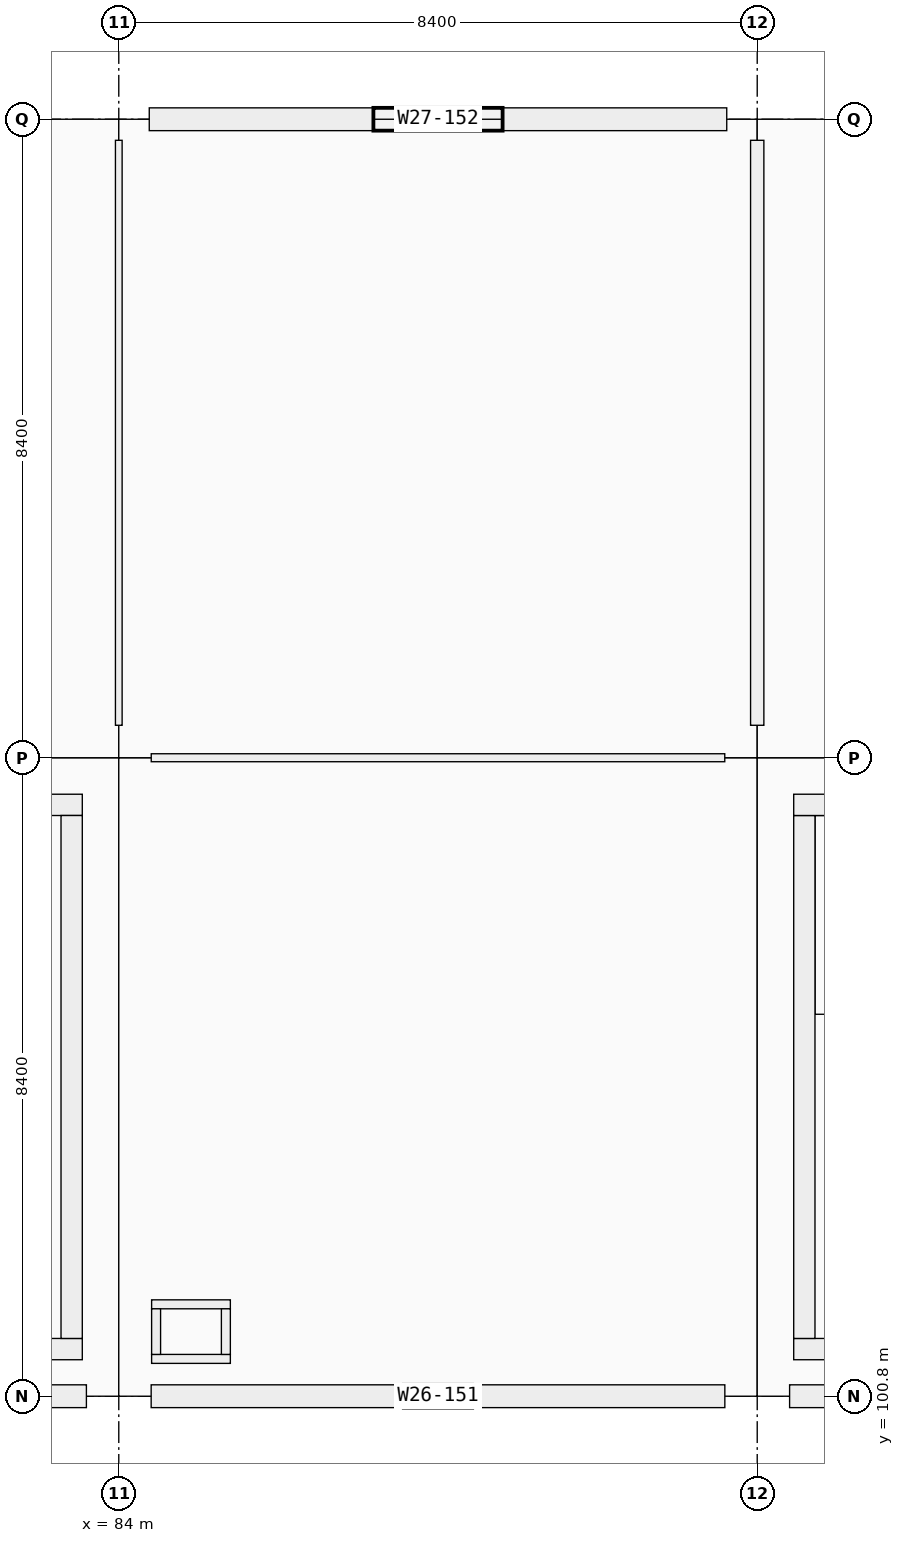
"""IFC4 building model, lengths in metres.
Left out: names, types, materials, properties, quantities, classifications, styles, units other than length and angle.
Written with IfcOpenShell. Run it as: python <this file> out.ifc"""

import sys

from ifc_helpers import new_model, si_unit, direction, frame, frame_2d, origin, origin_2d, place, context, subcontext, project, spatial, rectangle, extrude, element, fill, save


model = new_model("IFC4")
c1 = context("Model", 3, precision=1e-05, world=origin(), true_north=direction((0.0, 1.0)))
c2 = subcontext(c1, "Body", "Model", "MODEL_VIEW")
j1 = project(units=[si_unit("LENGTHUNIT", "METRE"), si_unit("PLANEANGLEUNIT", "RADIAN")], contexts=[c1])
p1 = place(None, origin())
s1 = spatial("IfcSite", under=j1, at=p1, CompositionType="ELEMENT")
p2 = place(p1, origin())
s2 = spatial("IfcBuilding", under=s1, at=p2, CompositionType="ELEMENT")
p3 = place(p2, frame((0.0, 0.0, 10.26)))
s3 = spatial("IfcBuildingStorey", under=s2, at=p3, CompositionType="ELEMENT", Elevation=10.26)
for number, where, z_axis, x_axis in (
    (1, (84.0, 100.8, 0.0), (0.0, 0.0, 1.0), (1.0, 0.0, 0.0)),
    (2, (84.0, 109.2, 0.0), (0.0, 0.0, 1.0), (1.0, 0.0, 0.0)),
):
    element("IfcColumn", number, at=place(p3, frame(where, z_axis=z_axis, x_axis=x_axis)), inside=s3, PredefinedType="COLUMN", context=c2, shape_type="SweptSolid", body=[
        extrude(rectangle(XDim=0.85, YDim=0.85, at=origin_2d()), origin(), (0.0, 0.0, 1.0), 4.5),
    ])
p4 = place(p3, frame((84.0, 117.6, 0.0), z_axis=(0.0, 0.0, 1.0), x_axis=(1.0, 0.0, 0.0)))
e3 = element("IfcColumn", 3, at=p4, inside=s3, PredefinedType="COLUMN", context=c2, shape_type="SweptSolid", body=[
    extrude(rectangle(XDim=0.8, YDim=0.55, at=origin_2d()), origin(), (0.0, 0.0, 1.0), 4.5),
])
for number, where, z_axis, x_axis in (
    (4, (92.4, 100.8, 0.0), (0.0, 0.0, 1.0), (1.0, 0.0, 0.0)),
    (5, (92.4, 109.2, 0.0), (0.0, 0.0, 1.0), (1.0, 0.0, 0.0)),
):
    element("IfcColumn", number, at=place(p3, frame(where, z_axis=z_axis, x_axis=x_axis)), inside=s3, PredefinedType="COLUMN", context=c2, shape_type="SweptSolid", body=[
        extrude(rectangle(XDim=0.85, YDim=0.85, at=origin_2d()), origin(), (0.0, 0.0, 1.0), 4.5),
    ])
p5 = place(p3, frame((92.4, 117.6, 0.0), z_axis=(0.0, 0.0, 1.0), x_axis=(1.0, 0.0, 0.0)))
e6 = element("IfcColumn", 6, at=p5, inside=s3, PredefinedType="COLUMN", context=c2, shape_type="SweptSolid", body=[
    extrude(rectangle(XDim=0.8, YDim=0.55, at=origin_2d()), origin(), (0.0, 0.0, 1.0), 4.5),
])
p6 = place(p3, frame((83.574, 100.8, 0.0), z_axis=(0.0, 0.0, 1.0), x_axis=(-1.0, 0.0, 0.0)))
e7 = element("IfcWall", 7, at=p6, inside=s3, PredefinedType="SOLIDWALL", context=c2, shape_type="SweptSolid", body=[
    extrude(rectangle(XDim=7.548, YDim=0.3, at=frame_2d((3.774, 0.0))), origin(), (0.0, 0.0, 1.0), 3.54),
])
p7 = place(p3, frame((91.974, 100.8, 0.0), z_axis=(0.0, 0.0, 1.0), x_axis=(-1.0, 0.0, 0.0)))
e8 = element("IfcWall", 8, at=p7, inside=s3, PredefinedType="SOLIDWALL", context=c2, shape_type="SweptSolid", body=[
    extrude(rectangle(XDim=7.548, YDim=0.3, at=frame_2d((3.774, 0.0))), origin(), (0.0, 0.0, 1.0), 3.54),
])
p8 = place(p7, frame((3.324, 0.0, 0.9)))
e9 = element("IfcOpeningElement", 9, at=p8, cuts=e8, PredefinedType="OPENING", context=c2, shape_type="SweptSolid", body=[
    extrude(rectangle(XDim=0.9, YDim=1.5, at=frame_2d((0.45, 0.75))), frame((0.0, 0.15, 0.0), z_axis=(0.0, -1.0, 0.0), x_axis=(1.0, 0.0, 0.0)), (0.0, 0.0, 1.0), 0.3),
])
p9 = place(p3, frame((84.401, 117.6, 0.0), z_axis=(0.0, 0.0, 1.0), x_axis=(1.0, 0.0, 0.0)))
e10 = element("IfcWall", 10, at=p9, inside=s3, PredefinedType="SOLIDWALL", context=c2, shape_type="SweptSolid", body=[
    extrude(rectangle(XDim=7.598, YDim=0.3, at=frame_2d((3.799, 0.0))), origin(), (0.0, 0.0, 1.0), 3.54),
])
p10 = place(p9, frame((2.949, 0.0, 0.9)))
e11 = element("IfcOpeningElement", 11, at=p10, cuts=e10, PredefinedType="OPENING", context=c2, shape_type="SweptSolid", body=[
    extrude(rectangle(XDim=1.7, YDim=1.85, at=frame_2d((0.85, 0.925))), frame((0.0, 0.15, 0.0), z_axis=(0.0, -1.0, 0.0), x_axis=(1.0, 0.0, 0.0)), (0.0, 0.0, 1.0), 0.3),
])
p11 = place(p3, frame((100.374, 100.8, 0.0), z_axis=(0.0, 0.0, 1.0), x_axis=(-1.0, 0.0, 0.0)))
e12 = element("IfcWall", 12, at=p11, inside=s3, PredefinedType="SOLIDWALL", context=c2, shape_type="SweptSolid", body=[
    extrude(rectangle(XDim=7.548, YDim=0.3, at=frame_2d((3.774, 0.0))), origin(), (0.0, 0.0, 1.0), 3.54),
])
for number, where, z_axis, x_axis in (
    (13, (83.52, 101.42, 0.0), (0.0, 0.0, 1.0), (-1.0, 0.0, 0.0)),
    (14, (76.08, 108.58, 0.0), (0.0, 0.0, 1.0), (1.0, 0.0, 0.0)),
):
    element("IfcWall", number, at=place(p3, frame(where, z_axis=z_axis, x_axis=x_axis)), inside=s3, PredefinedType="SHEAR", context=c2, shape_type="SweptSolid", body=[
        extrude(rectangle(XDim=7.44, YDim=0.28, at=frame_2d((3.72, 0.0))), origin(), (0.0, 0.0, 1.0), 4.5),
    ])
p12 = place(p3, frame((83.38, 108.44, 0.0), z_axis=(0.0, 0.0, 1.0), x_axis=(0.0, -1.0, 0.0)))
e15 = element("IfcWall", 15, at=p12, inside=s3, PredefinedType="SHEAR", context=c2, shape_type="SweptSolid", body=[
    extrude(rectangle(XDim=6.88, YDim=0.28, at=frame_2d((3.44, 0.0))), origin(), (0.0, 0.0, 1.0), 4.5),
])
p13 = place(p12, frame((3.99, 0.0, 0.0)))
e16 = element("IfcOpeningElement", 16, at=p13, cuts=e15, PredefinedType="OPENING", context=c2, shape_type="SweptSolid", body=[
    extrude(rectangle(XDim=1.5, YDim=2.15, at=frame_2d((0.75, 1.075))), frame((0.0, 0.14, 0.0), z_axis=(0.0, -1.0, 0.0), x_axis=(1.0, 0.0, 0.0)), (0.0, 0.0, 1.0), 0.28),
])
p14 = place(p3, frame((100.32, 101.42, 0.0), z_axis=(0.0, 0.0, 1.0), x_axis=(-1.0, 0.0, 0.0)))
e17 = element("IfcWall", 17, at=p14, inside=s3, PredefinedType="SHEAR", context=c2, shape_type="SweptSolid", body=[
    extrude(rectangle(XDim=7.44, YDim=0.28, at=frame_2d((3.72, 0.0))), origin(), (0.0, 0.0, 1.0), 4.5),
])
p15 = place(p3, frame((93.02, 101.56, 0.0), z_axis=(0.0, 0.0, 1.0), x_axis=(0.0, 1.0, 0.0)))
e18 = element("IfcWall", 18, at=p15, inside=s3, PredefinedType="SHEAR", context=c2, shape_type="SweptSolid", body=[
    extrude(rectangle(XDim=6.88, YDim=0.28, at=frame_2d((3.44, 0.0))), origin(), (0.0, 0.0, 1.0), 4.5),
])
p16 = place(p3, frame((92.88, 108.58, 0.0), z_axis=(0.0, 0.0, 1.0), x_axis=(1.0, 0.0, 0.0)))
e19 = element("IfcWall", 19, at=p16, inside=s3, PredefinedType="SHEAR", context=c2, shape_type="SweptSolid", body=[
    extrude(rectangle(XDim=7.44, YDim=0.28, at=frame_2d((3.72, 0.0))), origin(), (0.0, 0.0, 1.0), 4.5),
])
for number, where, z_axis, x_axis in (
    (20, (84.432, 101.291, 0.0), (0.0, 0.0, 1.0), (1.0, 0.0, 0.0)),
    (21, (84.432, 102.009, 0.0), (0.0, 0.0, 1.0), (1.0, 0.0, 0.0)),
):
    element("IfcWall", number, at=place(p3, frame(where, z_axis=z_axis, x_axis=x_axis)), inside=s3, PredefinedType="PARTITIONING", context=c2, shape_type="SweptSolid", body=[
        extrude(rectangle(XDim=1.036, YDim=0.118, at=frame_2d((0.518, 0.0))), origin(), (0.0, 0.0, 1.0), 3.53),
    ])
for number, where, z_axis, x_axis in (
    (22, (84.491, 101.35, 0.0), (0.0, 0.0, 1.0), (0.0, 1.0, 0.0)),
    (23, (85.409, 101.35, 0.0), (0.0, 0.0, 1.0), (0.0, 1.0, 0.0)),
):
    element("IfcWall", number, at=place(p3, frame(where, z_axis=z_axis, x_axis=x_axis)), inside=s3, PredefinedType="PARTITIONING", context=c2, shape_type="SweptSolid", body=[
        extrude(rectangle(XDim=0.6, YDim=0.118, at=frame_2d((0.3, 0.0))), origin(), (0.0, 0.0, 1.0), 3.53),
    ])
p17 = place(p3, frame((84.427, 109.2, 0.0), z_axis=(0.0, 0.0, 1.0), x_axis=(1.0, 0.0, 0.0)))
e24 = element("IfcWall", 24, at=p17, inside=s3, PredefinedType="PARTITIONING", context=c2, shape_type="SweptSolid", body=[
    extrude(rectangle(XDim=7.546, YDim=0.105, at=frame_2d((3.773, 0.0))), origin(), (0.0, 0.0, 1.0), 3.37),
])
p18 = place(p17, frame((3.288, 0.0, 0.0)))
e25 = element("IfcOpeningElement", 25, at=p18, cuts=e24, PredefinedType="OPENING", context=c2, shape_type="SweptSolid", body=[
    extrude(rectangle(XDim=0.97, YDim=2.12, at=frame_2d((0.485, 1.06))), frame((0.0, 0.052, 0.0), z_axis=(0.0, -1.0, 0.0), x_axis=(1.0, 0.0, 0.0)), (0.0, 0.0, 1.0), 0.105),
])
p19 = place(p3, frame((84.0, 109.627, 0.0), z_axis=(0.0, 0.0, 1.0), x_axis=(0.0, 1.0, 0.0)))
e26 = element("IfcWall", 26, at=p19, inside=s3, PredefinedType="PARTITIONING", context=c2, shape_type="SweptSolid", body=[
    extrude(rectangle(XDim=7.696, YDim=0.088, at=frame_2d((3.848, 0.0))), origin(), (0.0, 0.0, 1.0), 3.37),
])
p20 = place(p19, frame((3.343, 0.0, 0.0)))
e27 = element("IfcOpeningElement", 27, at=p20, cuts=e26, PredefinedType="OPENING", context=c2, shape_type="SweptSolid", body=[
    extrude(rectangle(XDim=1.01, YDim=2.12, at=frame_2d((0.505, 1.06))), frame((0.0, 0.044, 0.0), z_axis=(0.0, -1.0, 0.0), x_axis=(1.0, 0.0, 0.0)), (0.0, 0.0, 1.0), 0.088),
])
p21 = place(p3, frame((92.4, 109.627, 0.0), z_axis=(0.0, 0.0, 1.0), x_axis=(0.0, 1.0, 0.0)))
e28 = element("IfcWall", 28, at=p21, inside=s3, PredefinedType="PARTITIONING", context=c2, shape_type="SweptSolid", body=[
    extrude(rectangle(XDim=7.696, YDim=0.175, at=frame_2d((3.848, 0.0))), origin(), (0.0, 0.0, 1.0), 3.37),
])
p22 = place(p21, frame((3.363, 0.0, 0.0)))
e29 = element("IfcOpeningElement", 29, at=p22, cuts=e28, PredefinedType="OPENING", context=c2, shape_type="SweptSolid", body=[
    extrude(rectangle(XDim=0.97, YDim=2.12, at=frame_2d((0.485, 1.06))), frame((0.0, 0.087, 0.0), z_axis=(0.0, -1.0, 0.0), x_axis=(1.0, 0.0, 0.0)), (0.0, 0.0, 1.0), 0.175),
])
p23 = place(p8, origin())
e30 = element("IfcWindow", 30, at=p23, inside=s3, PartitioningType="SINGLE_PANEL", PredefinedType="WINDOW", context=c2, shape_type="SweptSolid", body=[
    extrude(rectangle(XDim=0.9, YDim=1.5, at=frame_2d((0.45, 0.75))), frame((0.0, 0.03, 0.0), z_axis=(0.0, -1.0, 0.0), x_axis=(1.0, 0.0, 0.0)), (0.0, 0.0, 1.0), 0.06),
])
fill(e9, e30)
p24 = place(p10, origin())
e31 = element("IfcWindow", 31, at=p24, inside=s3, PartitioningType="SINGLE_PANEL", PredefinedType="WINDOW", context=c2, shape_type="SweptSolid", body=[
    extrude(rectangle(XDim=1.7, YDim=1.85, at=frame_2d((0.85, 0.925))), frame((0.0, 0.03, 0.0), z_axis=(0.0, -1.0, 0.0), x_axis=(1.0, 0.0, 0.0)), (0.0, 0.0, 1.0), 0.06),
])
fill(e11, e31)
p25 = place(p13, origin())
e32 = element("IfcDoor", 32, at=p25, inside=s3, OperationType="DOUBLE_DOOR_SINGLE_SWING", PredefinedType="DOOR", context=c2, shape_type="SweptSolid", body=[
    extrude(rectangle(XDim=1.5, YDim=2.15, at=frame_2d((0.75, 1.075))), frame((0.0, 0.025, 0.0), z_axis=(0.0, -1.0, 0.0), x_axis=(1.0, 0.0, 0.0)), (0.0, 0.0, 1.0), 0.05),
])
fill(e16, e32)
p26 = place(p18, origin())
e33 = element("IfcDoor", 33, at=p26, inside=s3, OperationType="SINGLE_SWING_LEFT", PredefinedType="DOOR", context=c2, shape_type="SweptSolid", body=[
    extrude(rectangle(XDim=0.97, YDim=2.12, at=frame_2d((0.485, 1.06))), frame((0.0, 0.025, 0.0), z_axis=(0.0, -1.0, 0.0), x_axis=(1.0, 0.0, 0.0)), (0.0, 0.0, 1.0), 0.05),
])
fill(e25, e33)
p27 = place(p20, origin())
e34 = element("IfcDoor", 34, at=p27, inside=s3, OperationType="SINGLE_SWING_RIGHT", PredefinedType="DOOR", context=c2, shape_type="SweptSolid", body=[
    extrude(rectangle(XDim=1.01, YDim=2.12, at=frame_2d((0.505, 1.06))), frame((0.0, 0.025, 0.0), z_axis=(0.0, -1.0, 0.0), x_axis=(1.0, 0.0, 0.0)), (0.0, 0.0, 1.0), 0.05),
])
fill(e27, e34)
p28 = place(p22, origin())
e35 = element("IfcDoor", 35, at=p28, inside=s3, OperationType="SINGLE_SWING_LEFT", PredefinedType="DOOR", context=c2, shape_type="SweptSolid", body=[
    extrude(rectangle(XDim=0.97, YDim=2.12, at=frame_2d((0.485, 1.06))), frame((0.0, 0.025, 0.0), z_axis=(0.0, -1.0, 0.0), x_axis=(1.0, 0.0, 0.0)), (0.0, 0.0, 1.0), 0.05),
])
fill(e29, e35)
save(model, sys.argv[1])
